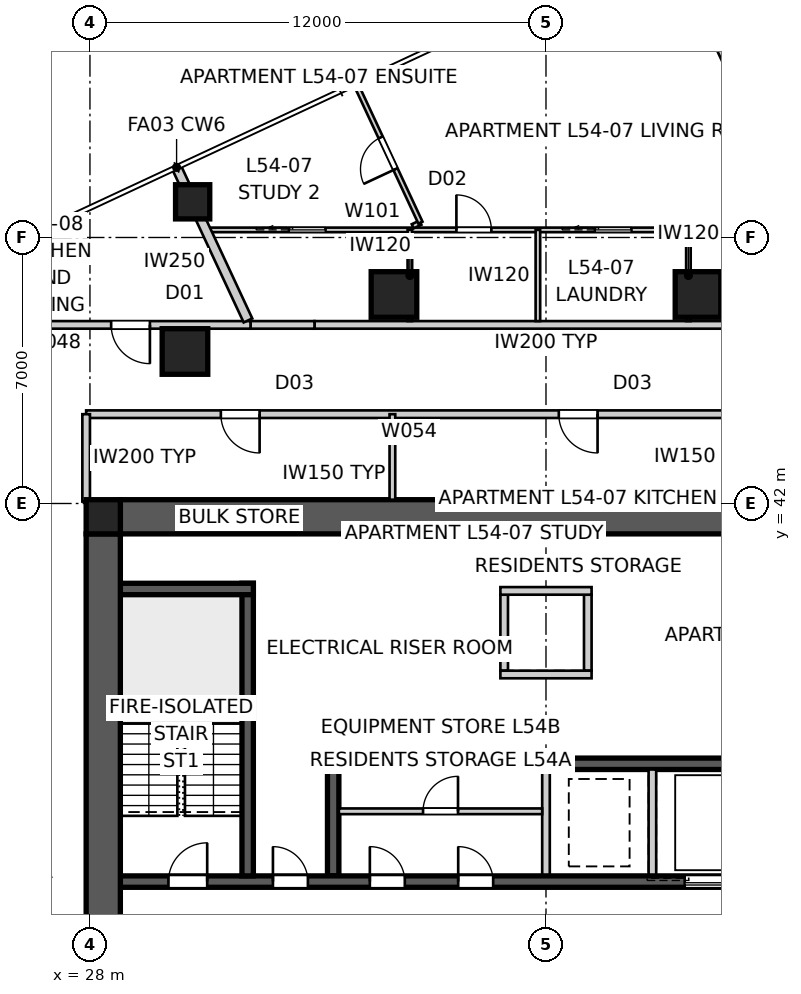
"""IFC4 building model, lengths in metres.
Left out: names, types, materials, properties, quantities, classifications, styles, units other than length and angle.
Written with IfcOpenShell. Run it as: python <this file> out.ifc"""

import sys

from ifc_helpers import new_model, si_unit, direction, frame, frame_2d, origin, origin_2d, place, context, subcontext, project, spatial, polyline, rectangle, outline, extrude, element, fill, save


model = new_model("IFC4")
c1 = context("Model", 3, precision=1e-05, world=origin(), true_north=direction((0.0, 1.0)))
c2 = subcontext(c1, "Body", "Model", "MODEL_VIEW")
j1 = project(units=[si_unit("LENGTHUNIT", "METRE"), si_unit("PLANEANGLEUNIT", "RADIAN")], contexts=[c1])
p1 = place(None, origin())
s1 = spatial("IfcSite", under=j1, at=p1, CompositionType="ELEMENT")
p2 = place(p1, origin())
s2 = spatial("IfcBuilding", under=s1, at=p2, CompositionType="ELEMENT")
p3 = place(p2, frame((0.0, 0.0, 196.4)))
s3 = spatial("IfcBuildingStorey", under=s2, at=p3, CompositionType="ELEMENT", Elevation=196.4)
p4 = place(p3, frame((28.8, 41.65, 0.0), z_axis=(0.0, 0.0, 1.0), x_axis=(1.0, 0.0, 0.0)))
e1 = element("IfcWall", 1, at=p4, inside=s3, PredefinedType="SHEAR", context=c2, shape_type="SweptSolid", body=[
    extrude(outline(polyline([(0.0, -0.45), (22.4, -0.45), (22.4, -0.025), (22.85, -0.025), (22.85, 0.025), (22.4, 0.025), (22.4, 0.45), (0.0, 0.45), (0.0, 0.025), (-0.45, 0.025), (-0.45, -0.025), (0.0, -0.025), (0.0, -0.45)])), origin(), (0.0, 0.0, 1.0), 3.4),
])
p5 = place(p3, frame((28.35, 41.2, 0.0), z_axis=(0.0, 0.0, 1.0), x_axis=(0.0, -1.0, 0.0)))
e2 = element("IfcWall", 2, at=p5, inside=s3, PredefinedType="SHEAR", context=c2, shape_type="SweptSolid", body=[
    extrude(outline(polyline([(0.0, -0.45), (22.4, -0.45), (22.4, -0.025), (22.85, -0.025), (22.85, 0.025), (22.4, 0.025), (22.4, 0.45), (0.0, 0.45), (0.0, 0.025), (-0.45, 0.025), (-0.45, -0.025), (0.0, -0.025), (0.0, -0.45)])), origin(), (0.0, 0.0, 1.0), 3.4),
])
p6 = place(p5, frame((11.14, 0.0, 0.0)))
e3 = element("IfcOpeningElement", 3, at=p6, cuts=e2, PredefinedType="OPENING", context=c2, shape_type="SweptSolid", body=[
    extrude(rectangle(XDim=1.02, YDim=2.4, at=frame_2d((0.51, 1.2))), frame((0.0, 0.46, 0.0), z_axis=(0.0, -1.0, 0.0), x_axis=(1.0, 0.0, 0.0)), (0.0, 0.0, 1.0), 0.92),
])
p7 = place(p3, frame((28.8, 32.05, 0.0), z_axis=(0.0, 0.0, 1.0), x_axis=(1.0, 0.0, 0.0)))
e4 = element("IfcWall", 4, at=p7, inside=s3, PredefinedType="SHEAR", context=c2, shape_type="SweptSolid", body=[
    extrude(rectangle(XDim=22.4, YDim=0.3, at=frame_2d((11.2, 0.0))), origin(), (0.0, 0.0, 1.0), 3.4),
])
p8 = place(p7, frame((19.04, 0.0, 0.0)))
e5 = element("IfcOpeningElement", 5, at=p8, cuts=e4, PredefinedType="OPENING", context=c2, shape_type="SweptSolid", body=[
    extrude(rectangle(XDim=0.92, YDim=2.1, at=frame_2d((0.46, 1.05))), frame((0.0, 0.16, 0.0), z_axis=(0.0, -1.0, 0.0), x_axis=(1.0, 0.0, 0.0)), (0.0, 0.0, 1.0), 0.32),
])
p9 = place(p7, frame((1.265, 0.0, 0.0)))
e6 = element("IfcOpeningElement", 6, at=p9, cuts=e4, PredefinedType="OPENING", context=c2, shape_type="SweptSolid", body=[
    extrude(rectangle(XDim=1.02, YDim=2.1, at=frame_2d((0.51, 1.05))), frame((0.0, 0.16, 0.0), z_axis=(0.0, -1.0, 0.0), x_axis=(1.0, 0.0, 0.0)), (0.0, 0.0, 1.0), 0.32),
])
p10 = place(p7, frame((4.015, 0.0, 0.0)))
e7 = element("IfcOpeningElement", 7, at=p10, cuts=e4, PredefinedType="OPENING", context=c2, shape_type="SweptSolid", body=[
    extrude(rectangle(XDim=0.92, YDim=2.1, at=frame_2d((0.46, 1.05))), frame((0.0, 0.16, 0.0), z_axis=(0.0, -1.0, 0.0), x_axis=(1.0, 0.0, 0.0)), (0.0, 0.0, 1.0), 0.32),
])
p11 = place(p7, frame((6.565, 0.0, 0.0)))
e8 = element("IfcOpeningElement", 8, at=p11, cuts=e4, PredefinedType="OPENING", context=c2, shape_type="SweptSolid", body=[
    extrude(rectangle(XDim=0.92, YDim=2.1, at=frame_2d((0.46, 1.05))), frame((0.0, 0.16, 0.0), z_axis=(0.0, -1.0, 0.0), x_axis=(1.0, 0.0, 0.0)), (0.0, 0.0, 1.0), 0.32),
])
p12 = place(p7, frame((8.89, 0.0, 0.0)))
e9 = element("IfcOpeningElement", 9, at=p12, cuts=e4, PredefinedType="OPENING", context=c2, shape_type="SweptSolid", body=[
    extrude(rectangle(XDim=0.92, YDim=2.1, at=frame_2d((0.46, 1.05))), frame((0.0, 0.16, 0.0), z_axis=(0.0, -1.0, 0.0), x_axis=(1.0, 0.0, 0.0)), (0.0, 0.0, 1.0), 0.32),
])
p13 = place(p7, frame((14.85, 0.0, 0.0)))
e10 = element("IfcOpeningElement", 10, at=p13, cuts=e4, PredefinedType="OPENING", context=c2, shape_type="SweptSolid", body=[
    extrude(rectangle(XDim=1.1, YDim=2.1, at=frame_2d((0.55, 1.05))), frame((0.0, 0.16, 0.0), z_axis=(0.0, -1.0, 0.0), x_axis=(1.0, 0.0, 0.0)), (0.0, 0.0, 1.0), 0.32),
])
p14 = place(p3, frame((34.25, 35.15, 0.0), z_axis=(0.0, 0.0, 1.0), x_axis=(1.0, 0.0, 0.0)))
e11 = element("IfcWall", 11, at=p14, inside=s3, PredefinedType="SHEAR", context=c2, shape_type="SweptSolid", body=[
    extrude(rectangle(XDim=11.5, YDim=0.3, at=frame_2d((5.75, 0.0))), origin(), (0.0, 0.0, 1.0), 3.4),
])
p15 = place(p3, frame((34.4, 32.2, 0.0), z_axis=(0.0, 0.0, 1.0), x_axis=(0.0, 1.0, 0.0)))
e12 = element("IfcWall", 12, at=p15, inside=s3, PredefinedType="SHEAR", context=c2, shape_type="SweptSolid", body=[
    extrude(rectangle(XDim=2.8, YDim=0.3, at=frame_2d((1.4, 0.0))), origin(), (0.0, 0.0, 1.0), 3.4),
])
for number, where, z_axis, x_axis in (
    (13, (40.0, 32.2, 0.0), (0.0, 0.0, 1.0), (0.0, 1.0, 0.0)),
    (14, (42.8, 32.2, 0.0), (0.0, 0.0, 1.0), (0.0, 1.0, 0.0)),
):
    element("IfcWall", number, at=place(p3, frame(where, z_axis=z_axis, x_axis=x_axis)), inside=s3, PredefinedType="SOLIDWALL", context=c2, shape_type="SweptSolid", body=[
        extrude(rectangle(XDim=2.8, YDim=0.2, at=frame_2d((1.4, 0.0))), origin(), (0.0, 0.0, 1.0), 3.4),
    ])
p16 = place(p3, frame((32.15, 32.2, 0.0), z_axis=(0.0, 0.0, 1.0), x_axis=(0.0, 1.0, 0.0)))
e15 = element("IfcWall", 15, at=p16, inside=s3, PredefinedType="SHEAR", context=c2, shape_type="SweptSolid", body=[
    extrude(rectangle(XDim=7.7, YDim=0.3, at=frame_2d((3.85, 0.0))), origin(), (0.0, 0.0, 1.0), 3.4),
])
p17 = place(p3, frame((28.8, 39.75, 0.0), z_axis=(0.0, 0.0, 1.0), x_axis=(1.0, 0.0, 0.0)))
e16 = element("IfcWall", 16, at=p17, inside=s3, PredefinedType="SHEAR", context=c2, shape_type="SweptSolid", body=[
    extrude(rectangle(XDim=3.5, YDim=0.3, at=frame_2d((1.75, 0.0))), origin(), (0.0, 0.0, 1.0), 3.4),
])
for number, where, z_axis, x_axis in (
    (17, (38.9, 37.6, 0.0), (0.0, 0.0, 1.0), (0.0, 1.0, 0.0)),
    (18, (41.1, 37.6, 0.0), (0.0, 0.0, 1.0), (0.0, 1.0, 0.0)),
):
    element("IfcWall", number, at=place(p3, frame(where, z_axis=z_axis, x_axis=x_axis)), inside=s3, PredefinedType="SOLIDWALL", context=c2, shape_type="SweptSolid", body=[
        extrude(rectangle(XDim=2.0, YDim=0.2, at=frame_2d((1.0, 0.0))), origin(), (0.0, 0.0, 1.0), 3.4),
    ])
for number, where, z_axis, x_axis in (
    (19, (38.8, 37.5, 0.0), (0.0, 0.0, 1.0), (1.0, 0.0, 0.0)),
    (20, (38.8, 39.7, 0.0), (0.0, 0.0, 1.0), (1.0, 0.0, 0.0)),
):
    element("IfcWall", number, at=place(p3, frame(where, z_axis=z_axis, x_axis=x_axis)), inside=s3, PredefinedType="SOLIDWALL", context=c2, shape_type="SweptSolid", body=[
        extrude(rectangle(XDim=2.4, YDim=0.2, at=frame_2d((1.2, 0.0))), origin(), (0.0, 0.0, 1.0), 3.4),
    ])
for number, where, z_axis, x_axis in (
    (21, (28.35, 41.65, 0.0), (0.0, 0.0, 1.0), (1.0, 0.0, 0.0)),
    (22, (30.702, 49.939, 0.0), (0.0, 0.0, 1.0), (1.0, 0.0, 0.0)),
):
    element("IfcColumn", number, at=place(p3, frame(where, z_axis=z_axis, x_axis=x_axis)), inside=s3, PredefinedType="COLUMN", context=c2, shape_type="SweptSolid", body=[
        extrude(rectangle(XDim=0.9, YDim=0.9, at=origin_2d()), origin(), (0.0, 0.0, 1.0), 3.4),
    ])
for number, where, z_axis, x_axis in (
    (23, (44.0, 47.5, 0.0), (0.0, 0.0, 1.0), (1.0, 0.0, 0.0)),
    (24, (36.0, 47.5, 0.0), (0.0, 0.0, 1.0), (1.0, 0.0, 0.0)),
    (25, (30.5, 46.0, 0.0), (0.0, 0.0, 1.0), (1.0, 0.0, 0.0)),
):
    element("IfcColumn", number, at=place(p3, frame(where, z_axis=z_axis, x_axis=x_axis)), inside=s3, PredefinedType="COLUMN", context=c2, shape_type="SweptSolid", body=[
        extrude(rectangle(XDim=1.2, YDim=1.2, at=origin_2d()), origin(), (0.0, 0.0, 1.0), 3.4),
    ])
p18 = place(p3, frame((46.092, 46.7, 0.0), z_axis=(0.0, 0.0, 1.0), x_axis=(-1.0, 0.0, 0.0)))
e26 = element("IfcWall", 26, at=p18, inside=s3, PredefinedType="PARTITIONING", context=c2, shape_type="SweptSolid", body=[
    extrude(rectangle(XDim=12.183, YDim=0.2, at=frame_2d((6.092, 0.0))), origin(), (0.0, 0.0, 1.0), 3.25),
])
p19 = place(p3, frame((33.908, 46.7, 0.0), z_axis=(0.0, 0.0, 1.0), x_axis=(-1.0, 0.0, 0.0)))
e27 = element("IfcWall", 27, at=p19, inside=s3, PredefinedType="PARTITIONING", context=c2, shape_type="SweptSolid", body=[
    extrude(rectangle(XDim=1.684, YDim=0.2, at=frame_2d((0.842, 0.0))), origin(), (0.0, 0.0, 1.0), 2.55),
])
p20 = place(p3, frame((32.225, 46.7, 0.0), z_axis=(0.0, 0.0, 1.0), x_axis=(-1.0, 0.0, 0.0)))
e28 = element("IfcWall", 28, at=p20, inside=s3, PredefinedType="PARTITIONING", context=c2, shape_type="SweptSolid", body=[
    extrude(rectangle(XDim=6.725, YDim=0.2, at=frame_2d((3.362, 0.0))), origin(), (0.0, 0.0, 1.0), 3.25),
])
p21 = place(p20, frame((2.647, 0.0, 0.0)))
e29 = element("IfcOpeningElement", 29, at=p21, cuts=e28, PredefinedType="OPENING", context=c2, shape_type="SweptSolid", body=[
    extrude(rectangle(XDim=1.02, YDim=2.34, at=frame_2d((0.51, 1.17))), frame((0.0, 0.11, 0.0), z_axis=(0.0, -1.0, 0.0), x_axis=(1.0, 0.0, 0.0)), (0.0, 0.0, 1.0), 0.22),
])
p22 = place(p3, frame((30.28, 50.845, 0.0), z_axis=(0.0, 0.0, 1.0), x_axis=(0.422614816594, -0.906309393527, 0.0)))
e30 = element("IfcWall", 30, at=p22, inside=s3, PredefinedType="PARTITIONING", context=c2, shape_type="SweptSolid", body=[
    extrude(rectangle(XDim=4.445, YDim=0.25, at=frame_2d((2.222, 0.0))), origin(), (0.0, 0.0, 1.0), 3.25),
])
p23 = place(p3, frame((52.1, 44.35, 0.0), z_axis=(0.0, 0.0, 1.0), x_axis=(-1.0, 0.0, 0.0)))
e31 = element("IfcWall", 31, at=p23, inside=s3, PredefinedType="PARTITIONING", context=c2, shape_type="SweptSolid", body=[
    extrude(rectangle(XDim=24.2, YDim=0.2, at=frame_2d((12.1, 0.0))), origin(), (0.0, 0.0, 1.0), 3.25),
])
p24 = place(p23, frame((10.743, 0.0, 0.0)))
e32 = element("IfcOpeningElement", 32, at=p24, cuts=e31, PredefinedType="OPENING", context=c2, shape_type="SweptSolid", body=[
    extrude(rectangle(XDim=1.02, YDim=2.1, at=frame_2d((0.51, 1.05))), frame((0.0, 0.11, 0.0), z_axis=(0.0, -1.0, 0.0), x_axis=(1.0, 0.0, 0.0)), (0.0, 0.0, 1.0), 0.22),
])
p25 = place(p23, frame((19.636, 0.0, 0.0)))
e33 = element("IfcOpeningElement", 33, at=p25, cuts=e31, PredefinedType="OPENING", context=c2, shape_type="SweptSolid", body=[
    extrude(rectangle(XDim=1.02, YDim=2.1, at=frame_2d((0.51, 1.05))), frame((0.0, 0.11, 0.0), z_axis=(0.0, -1.0, 0.0), x_axis=(1.0, 0.0, 0.0)), (0.0, 0.0, 1.0), 0.22),
])
p26 = place(p23, frame((3.297, 0.0, 0.0)))
e34 = element("IfcOpeningElement", 34, at=p26, cuts=e31, PredefinedType="OPENING", context=c2, shape_type="SweptSolid", body=[
    extrude(rectangle(XDim=1.02, YDim=2.1, at=frame_2d((0.51, 1.05))), frame((0.0, 0.11, 0.0), z_axis=(0.0, -1.0, 0.0), x_axis=(1.0, 0.0, 0.0)), (0.0, 0.0, 1.0), 0.22),
])
p27 = place(p3, frame((27.9, 44.35, 0.0), z_axis=(0.0, 0.0, 1.0), x_axis=(0.0, -1.0, 0.0)))
e35 = element("IfcWall", 35, at=p27, inside=s3, PredefinedType="PARTITIONING", context=c2, shape_type="SweptSolid", body=[
    extrude(rectangle(XDim=2.3, YDim=0.2, at=frame_2d((1.15, 0.0))), origin(), (0.0, 0.0, 1.0), 3.25),
])
p28 = place(p3, frame((35.958, 42.1, 0.0), z_axis=(0.0, 0.0, 1.0), x_axis=(0.0, 1.0, 0.0)))
e36 = element("IfcWall", 36, at=p28, inside=s3, PredefinedType="SOLIDWALL", context=c2, shape_type="SweptSolid", body=[
    extrude(rectangle(XDim=2.25, YDim=0.15, at=frame_2d((1.125, 0.0))), origin(), (0.0, 0.0, 1.0), 3.25),
])
p29 = place(p3, frame((31.047, 49.2, 0.0), z_axis=(0.0, 0.0, 1.0), x_axis=(1.0, 0.0, 0.0)))
e37 = element("IfcWall", 37, at=p29, inside=s3, PredefinedType="PARTITIONING", context=c2, shape_type="SweptSolid", body=[
    extrude(rectangle(XDim=25.333, YDim=0.12, at=frame_2d((12.667, 0.0))), origin(), (0.0, 0.0, 1.0), 3.25),
])
p30 = place(p29, frame((14.154, 0.0, 0.0)))
e38 = element("IfcOpeningElement", 38, at=p30, cuts=e37, PredefinedType="OPENING", context=c2, shape_type="SweptSolid", body=[
    extrude(rectangle(XDim=0.92, YDim=2.34, at=frame_2d((0.46, 1.17))), frame((0.0, 0.07, 0.0), z_axis=(0.0, -1.0, 0.0), x_axis=(1.0, 0.0, 0.0)), (0.0, 0.0, 1.0), 0.14),
])
p31 = place(p29, frame((10.24, 0.0, 0.0)))
e39 = element("IfcOpeningElement", 39, at=p31, cuts=e37, PredefinedType="OPENING", context=c2, shape_type="SweptSolid", body=[
    extrude(rectangle(XDim=0.96, YDim=2.1, at=frame_2d((0.48, 1.05))), frame((0.0, 0.07, 0.0), z_axis=(0.0, -1.0, 0.0), x_axis=(1.0, 0.0, 0.0)), (0.0, 0.0, 1.0), 0.14),
])
p32 = place(p29, frame((6.596, 0.0, 0.0)))
e40 = element("IfcOpeningElement", 40, at=p32, cuts=e37, PredefinedType="OPENING", context=c2, shape_type="SweptSolid", body=[
    extrude(rectangle(XDim=0.92, YDim=2.34, at=frame_2d((0.46, 1.17))), frame((0.0, 0.07, 0.0), z_axis=(0.0, -1.0, 0.0), x_axis=(1.0, 0.0, 0.0)), (0.0, 0.0, 1.0), 0.14),
])
p33 = place(p29, frame((2.19, 0.0, 0.0)))
e41 = element("IfcOpeningElement", 41, at=p33, cuts=e37, PredefinedType="OPENING", context=c2, shape_type="SweptSolid", body=[
    extrude(rectangle(XDim=0.96, YDim=2.1, at=frame_2d((0.48, 1.05))), frame((0.0, 0.07, 0.0), z_axis=(0.0, -1.0, 0.0), x_axis=(1.0, 0.0, 0.0)), (0.0, 0.0, 1.0), 0.14),
])
for number, where, z_axis, x_axis in (
    (42, (43.748, 46.8, 0.0), (0.0, 0.0, 1.0), (0.0, 1.0, 0.0)),
    (43, (36.418, 49.2, 0.0), (0.0, 0.0, 1.0), (0.0, -1.0, 0.0)),
    (44, (39.787, 46.8, 0.0), (0.0, 0.0, 1.0), (0.0, 1.0, 0.0)),
):
    element("IfcWall", number, at=place(p3, frame(where, z_axis=z_axis, x_axis=x_axis)), inside=s3, PredefinedType="PARTITIONING", context=c2, shape_type="SweptSolid", body=[
        extrude(rectangle(XDim=2.4, YDim=0.12, at=frame_2d((1.2, 0.0))), origin(), (0.0, 0.0, 1.0), 3.25),
    ])
p34 = place(p3, frame((43.211, 56.831, 0.0), z_axis=(0.0, 0.0, 1.0), x_axis=(0.422671204118, -0.906283097718, 0.0)))
e45 = element("IfcWall", 45, at=p34, inside=s3, PredefinedType="PARTITIONING", context=c2, shape_type="SweptSolid", body=[
    extrude(rectangle(XDim=3.93, YDim=0.12, at=frame_2d((1.965, 0.0))), origin(), (0.0, 0.0, 1.0), 3.25),
])
p35 = place(p3, frame((36.492, 49.295, 0.0), z_axis=(0.0, 0.0, 1.0), x_axis=(0.906653589403, 0.421875892677, 0.0)))
e46 = element("IfcWall", 46, at=p35, inside=s3, PredefinedType="PARTITIONING", context=c2, shape_type="SweptSolid", body=[
    extrude(rectangle(XDim=0.225, YDim=0.12, at=frame_2d((0.113, 0.0))), origin(), (0.0, 0.0, 1.0), 3.25),
])
p36 = place(p3, frame((36.697, 49.39, 0.0), z_axis=(0.0, 0.0, 1.0), x_axis=(-0.422771582019, 0.906236276827, 0.0)))
e47 = element("IfcWall", 47, at=p36, inside=s3, PredefinedType="PARTITIONING", context=c2, shape_type="SweptSolid", body=[
    extrude(rectangle(XDim=3.99, YDim=0.12, at=frame_2d((1.995, 0.0))), origin(), (0.0, 0.0, 1.0), 3.25),
])
p37 = place(p36, frame((1.555, 0.0, 0.0)))
e48 = element("IfcOpeningElement", 48, at=p37, cuts=e47, PredefinedType="OPENING", context=c2, shape_type="SweptSolid", body=[
    extrude(rectangle(XDim=0.92, YDim=2.34, at=frame_2d((0.46, 1.17))), frame((0.0, 0.07, 0.0), z_axis=(0.0, -1.0, 0.0), x_axis=(1.0, 0.0, 0.0)), (0.0, 0.0, 1.0), 0.14),
])
p38 = place(p3, frame((34.55, 33.9, 0.0), z_axis=(0.0, 0.0, 1.0), x_axis=(1.0, 0.0, 0.0)))
e49 = element("IfcWall", 49, at=p38, inside=s3, PredefinedType="SOLIDWALL", context=c2, shape_type="SweptSolid", body=[
    extrude(rectangle(XDim=5.35, YDim=0.15, at=frame_2d((2.675, 0.0))), origin(), (0.0, 0.0, 1.0), 3.25),
])
p39 = place(p38, frame((2.215, 0.0, 0.0)))
e50 = element("IfcOpeningElement", 50, at=p39, cuts=e49, PredefinedType="OPENING", context=c2, shape_type="SweptSolid", body=[
    extrude(rectangle(XDim=0.92, YDim=2.1, at=frame_2d((0.46, 1.05))), frame((0.0, 0.085, 0.0), z_axis=(0.0, -1.0, 0.0), x_axis=(1.0, 0.0, 0.0)), (0.0, 0.0, 1.0), 0.17),
])
p40 = place(p9, origin())
e51 = element("IfcDoor", 51, at=p40, inside=s3, OperationType="SINGLE_SWING_RIGHT", PredefinedType="DOOR", context=c2, shape_type="SweptSolid", body=[
    extrude(rectangle(XDim=1.02, YDim=2.1, at=frame_2d((0.51, 1.05))), frame((0.0, 0.025, 0.0), z_axis=(0.0, -1.0, 0.0), x_axis=(1.0, 0.0, 0.0)), (0.0, 0.0, 1.0), 0.05),
])
fill(e6, e51)
p41 = place(p10, origin())
e52 = element("IfcDoor", 52, at=p41, inside=s3, OperationType="SINGLE_SWING_LEFT", PredefinedType="DOOR", context=c2, shape_type="SweptSolid", body=[
    extrude(rectangle(XDim=0.92, YDim=2.1, at=frame_2d((0.46, 1.05))), frame((0.0, 0.025, 0.0), z_axis=(0.0, -1.0, 0.0), x_axis=(1.0, 0.0, 0.0)), (0.0, 0.0, 1.0), 0.05),
])
fill(e7, e52)
p42 = place(p24, origin())
e53 = element("IfcDoor", 53, at=p42, inside=s3, OperationType="SINGLE_SWING_LEFT", PredefinedType="DOOR", context=c2, shape_type="SweptSolid", body=[
    extrude(rectangle(XDim=1.02, YDim=2.1, at=frame_2d((0.51, 1.05))), frame((0.0, 0.025, 0.0), z_axis=(0.0, -1.0, 0.0), x_axis=(1.0, 0.0, 0.0)), (0.0, 0.0, 1.0), 0.05),
])
fill(e32, e53)
p43 = place(p25, origin())
e54 = element("IfcDoor", 54, at=p43, inside=s3, OperationType="SINGLE_SWING_LEFT", PredefinedType="DOOR", context=c2, shape_type="SweptSolid", body=[
    extrude(rectangle(XDim=1.02, YDim=2.1, at=frame_2d((0.51, 1.05))), frame((0.0, 0.025, 0.0), z_axis=(0.0, -1.0, 0.0), x_axis=(1.0, 0.0, 0.0)), (0.0, 0.0, 1.0), 0.05),
])
fill(e33, e54)
p44 = place(p21, origin())
e55 = element("IfcDoor", 55, at=p44, inside=s3, OperationType="SINGLE_SWING_LEFT", PredefinedType="DOOR", context=c2, shape_type="SweptSolid", body=[
    extrude(rectangle(XDim=1.02, YDim=2.34, at=frame_2d((0.51, 1.17))), frame((0.0, 0.025, 0.0), z_axis=(0.0, -1.0, 0.0), x_axis=(1.0, 0.0, 0.0)), (0.0, 0.0, 1.0), 0.05),
])
fill(e29, e55)
p45 = place(p37, origin())
e56 = element("IfcDoor", 56, at=p45, inside=s3, OperationType="SINGLE_SWING_LEFT", PredefinedType="DOOR", context=c2, shape_type="SweptSolid", body=[
    extrude(rectangle(XDim=0.92, YDim=2.34, at=frame_2d((0.46, 1.17))), frame((0.0, 0.025, 0.0), z_axis=(0.0, -1.0, 0.0), x_axis=(1.0, 0.0, 0.0)), (0.0, 0.0, 1.0), 0.05),
])
fill(e48, e56)
p46 = place(p31, origin())
e57 = element("IfcDoor", 57, at=p46, inside=s3, OperationType="SLIDING_TO_LEFT", PredefinedType="DOOR", context=c2, shape_type="SweptSolid", body=[
    extrude(rectangle(XDim=0.96, YDim=2.1, at=frame_2d((0.48, 1.05))), frame((0.0, 0.025, 0.0), z_axis=(0.0, -1.0, 0.0), x_axis=(1.0, 0.0, 0.0)), (0.0, 0.0, 1.0), 0.05),
])
fill(e39, e57)
p47 = place(p32, origin())
e58 = element("IfcDoor", 58, at=p47, inside=s3, OperationType="SINGLE_SWING_LEFT", PredefinedType="DOOR", context=c2, shape_type="SweptSolid", body=[
    extrude(rectangle(XDim=0.92, YDim=2.34, at=frame_2d((0.46, 1.17))), frame((0.0, 0.025, 0.0), z_axis=(0.0, -1.0, 0.0), x_axis=(1.0, 0.0, 0.0)), (0.0, 0.0, 1.0), 0.05),
])
fill(e40, e58)
p48 = place(p33, origin())
e59 = element("IfcDoor", 59, at=p48, inside=s3, OperationType="SLIDING_TO_LEFT", PredefinedType="DOOR", context=c2, shape_type="SweptSolid", body=[
    extrude(rectangle(XDim=0.96, YDim=2.1, at=frame_2d((0.48, 1.05))), frame((0.0, 0.025, 0.0), z_axis=(0.0, -1.0, 0.0), x_axis=(1.0, 0.0, 0.0)), (0.0, 0.0, 1.0), 0.05),
])
fill(e41, e59)
p49 = place(p11, origin())
e60 = element("IfcDoor", 60, at=p49, inside=s3, OperationType="SINGLE_SWING_LEFT", PredefinedType="DOOR", context=c2, shape_type="SweptSolid", body=[
    extrude(rectangle(XDim=0.92, YDim=2.1, at=frame_2d((0.46, 1.05))), frame((0.0, 0.025, 0.0), z_axis=(0.0, -1.0, 0.0), x_axis=(1.0, 0.0, 0.0)), (0.0, 0.0, 1.0), 0.05),
])
fill(e8, e60)
p50 = place(p12, origin())
e61 = element("IfcDoor", 61, at=p50, inside=s3, OperationType="SINGLE_SWING_LEFT", PredefinedType="DOOR", context=c2, shape_type="SweptSolid", body=[
    extrude(rectangle(XDim=0.92, YDim=2.1, at=frame_2d((0.46, 1.05))), frame((0.0, 0.025, 0.0), z_axis=(0.0, -1.0, 0.0), x_axis=(1.0, 0.0, 0.0)), (0.0, 0.0, 1.0), 0.05),
])
fill(e9, e61)
p51 = place(p39, origin())
e62 = element("IfcDoor", 62, at=p51, inside=s3, OperationType="SINGLE_SWING_RIGHT", PredefinedType="DOOR", context=c2, shape_type="SweptSolid", body=[
    extrude(rectangle(XDim=0.92, YDim=2.1, at=frame_2d((0.46, 1.05))), frame((0.0, 0.025, 0.0), z_axis=(0.0, -1.0, 0.0), x_axis=(1.0, 0.0, 0.0)), (0.0, 0.0, 1.0), 0.05),
])
fill(e50, e62)
p52 = place(p13, origin())
e63 = element("IfcDoor", 63, at=p52, inside=s3, OperationType="SLIDING_TO_LEFT", PredefinedType="DOOR", context=c2, shape_type="SweptSolid", body=[
    extrude(rectangle(XDim=1.1, YDim=2.1, at=frame_2d((0.55, 1.05))), frame((0.0, 0.025, 0.0), z_axis=(0.0, -1.0, 0.0), x_axis=(1.0, 0.0, 0.0)), (0.0, 0.0, 1.0), 0.05),
])
fill(e10, e63)
save(model, sys.argv[1])
